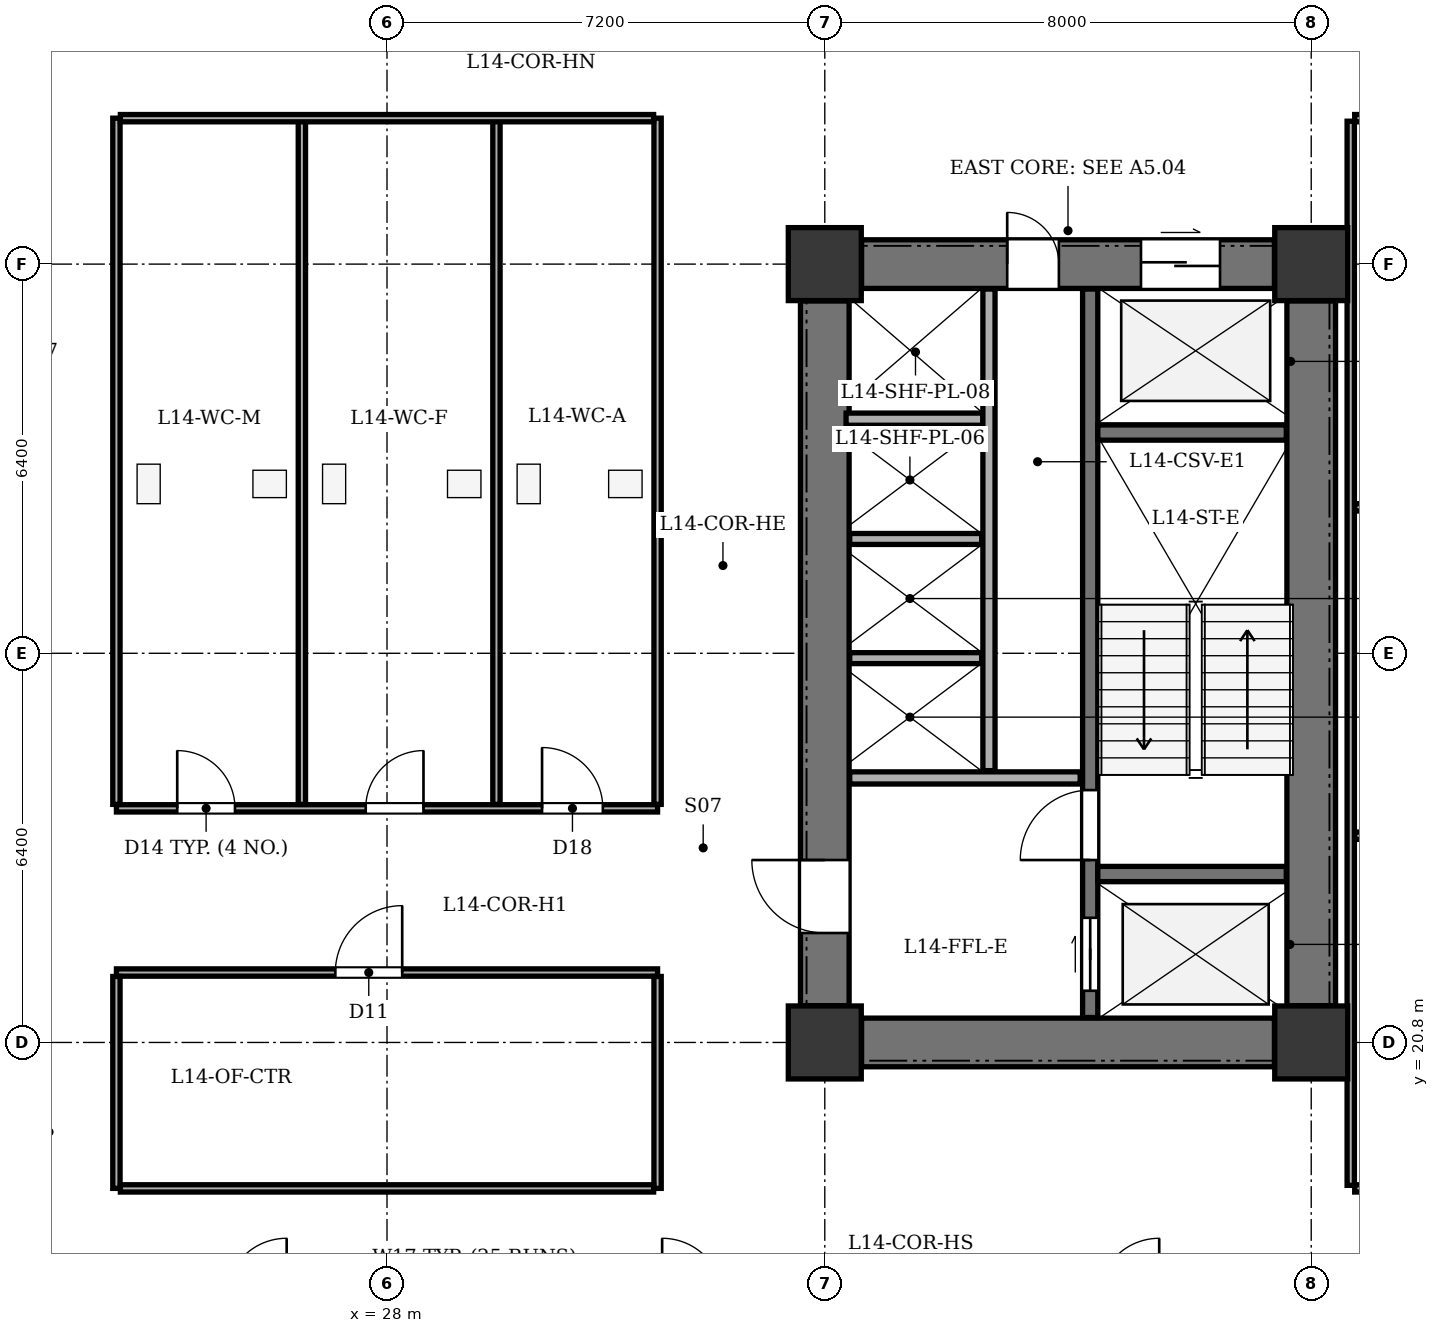
"""IFC4 building model, lengths in metres.
Left out: names, types, materials, properties, quantities, classifications, styles, units other than length and angle.
Written with IfcOpenShell. Run it as: python <this file> out.ifc"""

import sys

from ifc_helpers import new_model, si_unit, direction, frame, frame_2d, origin, origin_2d, place, context, subcontext, project, spatial, rectangle, extrude, element, fill, save


model = new_model("IFC4")
c1 = context("Model", 3, precision=1e-05, world=origin(), true_north=direction((0.0, 1.0)))
c2 = subcontext(c1, "Body", "Model", "MODEL_VIEW")
j1 = project(units=[si_unit("LENGTHUNIT", "METRE"), si_unit("PLANEANGLEUNIT", "RADIAN")], contexts=[c1])
p1 = place(None, origin())
s1 = spatial("IfcSite", under=j1, at=p1, CompositionType="ELEMENT")
p2 = place(p1, origin())
s2 = spatial("IfcBuilding", under=s1, at=p2, CompositionType="ELEMENT")
p3 = place(p2, frame((0.0, 0.0, 59.4)))
s3 = spatial("IfcBuildingStorey", under=s2, at=p3, CompositionType="ELEMENT", Elevation=59.4)
for number, where, z_axis, x_axis in (
    (1, (35.2, 20.8, 0.0), (0.0, 0.0, 1.0), (1.0, 0.0, 0.0)),
    (2, (43.2, 20.8, 0.0), (0.0, 0.0, 1.0), (1.0, 0.0, 0.0)),
    (3, (35.2, 33.6, 0.0), (0.0, 0.0, 1.0), (1.0, 0.0, 0.0)),
    (4, (43.2, 33.6, 0.0), (0.0, 0.0, 1.0), (1.0, 0.0, 0.0)),
):
    element("IfcColumn", number, at=place(p3, frame(where, z_axis=z_axis, x_axis=x_axis)), inside=s3, PredefinedType="COLUMN", context=c2, shape_type="SweptSolid", body=[
        extrude(rectangle(XDim=1.2, YDim=1.2, at=origin_2d()), origin(), (0.0, 0.0, 1.0), 3.9),
    ])
p4 = place(p3, frame((43.2, 21.405, 0.0), z_axis=(0.0, 0.0, 1.0), x_axis=(0.0, 1.0, 0.0)))
e5 = element("IfcWall", 5, at=p4, inside=s3, PredefinedType="SHEAR", context=c2, shape_type="SweptSolid", body=[
    extrude(rectangle(XDim=11.59, YDim=0.8, at=frame_2d((5.795, 0.0))), origin(), (0.0, 0.0, 1.0), 3.6),
])
p5 = place(p3, frame((35.805, 20.8, 0.0), z_axis=(0.0, 0.0, 1.0), x_axis=(1.0, 0.0, 0.0)))
e6 = element("IfcWall", 6, at=p5, inside=s3, PredefinedType="SHEAR", context=c2, shape_type="SweptSolid", body=[
    extrude(rectangle(XDim=6.79, YDim=0.8, at=frame_2d((3.395, 0.0))), origin(), (0.0, 0.0, 1.0), 3.6),
])
p6 = place(p3, frame((35.805, 33.6, 0.0), z_axis=(0.0, 0.0, 1.0), x_axis=(1.0, 0.0, 0.0)))
e7 = element("IfcWall", 7, at=p6, inside=s3, PredefinedType="SHEAR", context=c2, shape_type="SweptSolid", body=[
    extrude(rectangle(XDim=6.79, YDim=0.8, at=frame_2d((3.395, 0.0))), origin(), (0.0, 0.0, 1.0), 3.6),
])
p7 = place(p6, frame((4.595, 0.0, 0.0)))
e8 = element("IfcOpeningElement", 8, at=p7, cuts=e7, PredefinedType="OPENING", context=c2, shape_type="SweptSolid", body=[
    extrude(rectangle(XDim=1.3, YDim=2.15, at=frame_2d((0.65, 1.075))), frame((0.0, 0.41, 0.0), z_axis=(0.0, -1.0, 0.0), x_axis=(1.0, 0.0, 0.0)), (0.0, 0.0, 1.0), 0.82),
])
p8 = place(p6, frame((2.395, 0.0, 0.0)))
e9 = element("IfcOpeningElement", 9, at=p8, cuts=e7, PredefinedType="OPENING", context=c2, shape_type="SweptSolid", body=[
    extrude(rectangle(XDim=0.85, YDim=2.02, at=frame_2d((0.425, 1.01))), frame((0.0, 0.41, 0.0), z_axis=(0.0, -1.0, 0.0), x_axis=(1.0, 0.0, 0.0)), (0.0, 0.0, 1.0), 0.82),
])
p9 = place(p3, frame((35.2, 21.405, 0.0), z_axis=(0.0, 0.0, 1.0), x_axis=(0.0, 1.0, 0.0)))
e10 = element("IfcWall", 10, at=p9, inside=s3, PredefinedType="SHEAR", context=c2, shape_type="SweptSolid", body=[
    extrude(rectangle(XDim=11.59, YDim=0.8, at=frame_2d((5.795, 0.0))), origin(), (0.0, 0.0, 1.0), 3.6),
])
p10 = place(p9, frame((1.195, 0.0, 0.0)))
e11 = element("IfcOpeningElement", 11, at=p10, cuts=e10, PredefinedType="OPENING", context=c2, shape_type="SweptSolid", body=[
    extrude(rectangle(XDim=1.2, YDim=2.15, at=frame_2d((0.6, 1.075))), frame((0.0, 0.41, 0.0), z_axis=(0.0, -1.0, 0.0), x_axis=(1.0, 0.0, 0.0)), (0.0, 0.0, 1.0), 0.82),
])
p11 = place(p3, frame((39.565, 21.21, 0.0), z_axis=(0.0, 0.0, 1.0), x_axis=(0.0, 1.0, 0.0)))
e12 = element("IfcWall", 12, at=p11, inside=s3, PredefinedType="SHEAR", context=c2, shape_type="SweptSolid", body=[
    extrude(rectangle(XDim=11.98, YDim=0.25, at=frame_2d((5.99, 0.0))), origin(), (0.0, 0.0, 1.0), 3.6),
])
p12 = place(p11, frame((0.44, 0.0, 0.0)))
e13 = element("IfcOpeningElement", 13, at=p12, cuts=e12, PredefinedType="OPENING", context=c2, shape_type="SweptSolid", body=[
    extrude(rectangle(XDim=1.2, YDim=2.15, at=frame_2d((0.6, 1.075))), frame((0.0, 0.135, 0.0), z_axis=(0.0, -1.0, 0.0), x_axis=(1.0, 0.0, 0.0)), (0.0, 0.0, 1.0), 0.27),
])
p13 = place(p11, frame((2.59, 0.0, 0.0)))
e14 = element("IfcOpeningElement", 14, at=p13, cuts=e12, PredefinedType="OPENING", context=c2, shape_type="SweptSolid", body=[
    extrude(rectangle(XDim=1.15, YDim=2.15, at=frame_2d((0.575, 1.075))), frame((0.0, 0.135, 0.0), z_axis=(0.0, -1.0, 0.0), x_axis=(1.0, 0.0, 0.0)), (0.0, 0.0, 1.0), 0.27),
])
for number, where, z_axis, x_axis in (
    (15, (39.69, 23.57, 0.0), (0.0, 0.0, 1.0), (1.0, 0.0, 0.0)),
    (16, (39.69, 30.83, 0.0), (0.0, 0.0, 1.0), (1.0, 0.0, 0.0)),
):
    element("IfcWall", number, at=place(p3, frame(where, z_axis=z_axis, x_axis=x_axis)), inside=s3, PredefinedType="SHEAR", context=c2, shape_type="SweptSolid", body=[
        extrude(rectangle(XDim=3.1, YDim=0.25, at=frame_2d((1.55, 0.0))), origin(), (0.0, 0.0, 1.0), 3.6),
    ])
p14 = place(p3, frame((35.61, 25.15, 0.0), z_axis=(0.0, 0.0, 1.0), x_axis=(1.0, 0.0, 0.0)))
e17 = element("IfcWall", 17, at=p14, inside=s3, PredefinedType="SOLIDWALL", context=c2, shape_type="SweptSolid", body=[
    extrude(rectangle(XDim=3.79, YDim=0.2, at=frame_2d((1.895, 0.0))), origin(), (0.0, 0.0, 1.0), 3.6),
])
p15 = place(p3, frame((35.55, 31.05, 0.0), z_axis=(0.0, 0.0, 1.0), x_axis=(1.0, 0.0, 0.0)))
e18 = element("IfcWall", 18, at=p15, inside=s3, PredefinedType="SOLIDWALL", context=c2, shape_type="SweptSolid", body=[
    extrude(rectangle(XDim=2.25, YDim=0.2, at=frame_2d((1.125, 0.0))), origin(), (0.0, 0.0, 1.0), 3.6),
])
p16 = place(p3, frame((37.9, 25.27, 0.0), z_axis=(0.0, 0.0, 1.0), x_axis=(0.0, 1.0, 0.0)))
e19 = element("IfcWall", 19, at=p16, inside=s3, PredefinedType="SOLIDWALL", context=c2, shape_type="SweptSolid", body=[
    extrude(rectangle(XDim=7.92, YDim=0.2, at=frame_2d((3.96, 0.0))), origin(), (0.0, 0.0, 1.0), 3.6),
])
for number, where, z_axis, x_axis in (
    (20, (35.61, 27.12, 0.0), (0.0, 0.0, 1.0), (1.0, 0.0, 0.0)),
    (21, (35.61, 29.08, 0.0), (0.0, 0.0, 1.0), (1.0, 0.0, 0.0)),
):
    element("IfcWall", number, at=place(p3, frame(where, z_axis=z_axis, x_axis=x_axis)), inside=s3, PredefinedType="PARTITIONING", context=c2, shape_type="SweptSolid", body=[
        extrude(rectangle(XDim=2.17, YDim=0.18, at=frame_2d((1.085, 0.0))), origin(), (0.0, 0.0, 1.0), 3.6),
    ])
p17 = place(p3, frame((23.55, 24.65, 0.0), z_axis=(0.0, 0.0, 1.0), x_axis=(1.0, 0.0, 0.0)))
e22 = element("IfcWall", 22, at=p17, inside=s3, PredefinedType="PARTITIONING", context=c2, shape_type="SweptSolid", body=[
    extrude(rectangle(XDim=8.9, YDim=0.12, at=frame_2d((4.45, 0.0))), origin(), (0.0, 0.0, 1.0), 3.135),
])
p18 = place(p17, frame((1.0, 0.0, 0.0)))
e23 = element("IfcOpeningElement", 23, at=p18, cuts=e22, PredefinedType="OPENING", context=c2, shape_type="SweptSolid", body=[
    extrude(rectangle(XDim=0.95, YDim=2.1, at=frame_2d((0.475, 1.05))), frame((0.0, 0.07, 0.0), z_axis=(0.0, -1.0, 0.0), x_axis=(1.0, 0.0, 0.0)), (0.0, 0.0, 1.0), 0.14),
])
p19 = place(p17, frame((4.1, 0.0, 0.0)))
e24 = element("IfcOpeningElement", 24, at=p19, cuts=e22, PredefinedType="OPENING", context=c2, shape_type="SweptSolid", body=[
    extrude(rectangle(XDim=0.95, YDim=2.1, at=frame_2d((0.475, 1.05))), frame((0.0, 0.07, 0.0), z_axis=(0.0, -1.0, 0.0), x_axis=(1.0, 0.0, 0.0)), (0.0, 0.0, 1.0), 0.14),
])
p20 = place(p17, frame((7.0, 0.0, 0.0)))
e25 = element("IfcOpeningElement", 25, at=p20, cuts=e22, PredefinedType="OPENING", context=c2, shape_type="SweptSolid", body=[
    extrude(rectangle(XDim=1.0, YDim=2.1, at=frame_2d((0.5, 1.05))), frame((0.0, 0.07, 0.0), z_axis=(0.0, -1.0, 0.0), x_axis=(1.0, 0.0, 0.0)), (0.0, 0.0, 1.0), 0.14),
])
for number, where, z_axis, x_axis in (
    (26, (23.55, 24.715, 0.0), (0.0, 0.0, 1.0), (0.0, 1.0, 0.0)),
    (27, (32.45, 24.715, 0.0), (0.0, 0.0, 1.0), (0.0, 1.0, 0.0)),
    (28, (26.6, 24.715, 0.0), (0.0, 0.0, 1.0), (0.0, 1.0, 0.0)),
):
    element("IfcWall", number, at=place(p3, frame(where, z_axis=z_axis, x_axis=x_axis)), inside=s3, PredefinedType="PARTITIONING", context=c2, shape_type="SweptSolid", body=[
        extrude(rectangle(XDim=11.285, YDim=0.12, at=frame_2d((5.643, 0.0))), origin(), (0.0, 0.0, 1.0), 3.6),
    ])
p21 = place(p3, frame((29.8, 24.715, 0.0), z_axis=(0.0, 0.0, 1.0), x_axis=(0.0, 1.0, 0.0)))
e29 = element("IfcWall", 29, at=p21, inside=s3, PredefinedType="PARTITIONING", context=c2, shape_type="SweptSolid", body=[
    extrude(rectangle(XDim=11.285, YDim=0.12, at=frame_2d((5.643, 0.0))), origin(), (0.0, 0.0, 1.0), 3.135),
])
p22 = place(p3, frame((23.615, 36.0, 0.0), z_axis=(0.0, 0.0, 1.0), x_axis=(1.0, 0.0, 0.0)))
e30 = element("IfcWall", 30, at=p22, inside=s3, PredefinedType="PARTITIONING", context=c2, shape_type="SweptSolid", body=[
    extrude(rectangle(XDim=8.77, YDim=0.12, at=frame_2d((4.385, 0.0))), origin(), (0.0, 0.0, 1.0), 3.6),
])
p23 = place(p3, frame((23.55, 21.95, 0.0), z_axis=(0.0, 0.0, 1.0), x_axis=(1.0, 0.0, 0.0)))
e31 = element("IfcWall", 31, at=p23, inside=s3, PredefinedType="PARTITIONING", context=c2, shape_type="SweptSolid", body=[
    extrude(rectangle(XDim=8.9, YDim=0.12, at=frame_2d((4.45, 0.0))), origin(), (0.0, 0.0, 1.0), 3.135),
])
p24 = place(p23, frame((3.6, 0.0, 0.0)))
e32 = element("IfcOpeningElement", 32, at=p24, cuts=e31, PredefinedType="OPENING", context=c2, shape_type="SweptSolid", body=[
    extrude(rectangle(XDim=1.1, YDim=2.15, at=frame_2d((0.55, 1.075))), frame((0.0, 0.07, 0.0), z_axis=(0.0, -1.0, 0.0), x_axis=(1.0, 0.0, 0.0)), (0.0, 0.0, 1.0), 0.14),
])
for number, where, z_axis, x_axis in (
    (33, (23.55, 18.4, 0.0), (0.0, 0.0, 1.0), (0.0, 1.0, 0.0)),
    (34, (32.45, 18.4, 0.0), (0.0, 0.0, 1.0), (0.0, 1.0, 0.0)),
):
    element("IfcWall", number, at=place(p3, frame(where, z_axis=z_axis, x_axis=x_axis)), inside=s3, PredefinedType="PARTITIONING", context=c2, shape_type="SweptSolid", body=[
        extrude(rectangle(XDim=3.485, YDim=0.12, at=frame_2d((1.743, 0.0))), origin(), (0.0, 0.0, 1.0), 3.6),
    ])
p25 = place(p3, frame((23.615, 18.4, 0.0), z_axis=(0.0, 0.0, 1.0), x_axis=(1.0, 0.0, 0.0)))
e35 = element("IfcWall", 35, at=p25, inside=s3, PredefinedType="PARTITIONING", context=c2, shape_type="SweptSolid", body=[
    extrude(rectangle(XDim=8.77, YDim=0.12, at=frame_2d((4.385, 0.0))), origin(), (0.0, 0.0, 1.0), 3.6),
])
p26 = place(p3, frame((43.85, 18.45, 0.0), z_axis=(0.0, 0.0, 1.0), x_axis=(0.0, 1.0, 0.0)))
e36 = element("IfcWall", 36, at=p26, inside=s3, PredefinedType="PARTITIONING", context=c2, shape_type="SweptSolid", body=[
    extrude(rectangle(XDim=17.5, YDim=0.12, at=frame_2d((8.75, 0.0))), origin(), (0.0, 0.0, 1.0), 3.6),
])
p27 = place(p3, frame((43.915, 18.4, 0.0), z_axis=(0.0, 0.0, 1.0), x_axis=(1.0, 0.0, 0.0)))
e37 = element("IfcWall", 37, at=p27, inside=s3, PredefinedType="PARTITIONING", context=c2, shape_type="SweptSolid", body=[
    extrude(rectangle(XDim=11.38, YDim=0.12, at=frame_2d((5.69, 0.0))), origin(), (0.0, 0.0, 1.0), 3.6),
])
p28 = place(p27, frame((1.485, 0.0, 0.0)))
e38 = element("IfcOpeningElement", 38, at=p28, cuts=e37, PredefinedType="OPENING", context=c2, shape_type="SweptSolid", body=[
    extrude(rectangle(XDim=0.95, YDim=2.1, at=frame_2d((0.475, 1.05))), frame((0.0, 0.07, 0.0), z_axis=(0.0, -1.0, 0.0), x_axis=(1.0, 0.0, 0.0)), (0.0, 0.0, 1.0), 0.14),
])
p29 = place(p3, frame((43.915, 36.0, 0.0), z_axis=(0.0, 0.0, 1.0), x_axis=(1.0, 0.0, 0.0)))
e39 = element("IfcWall", 39, at=p29, inside=s3, PredefinedType="PARTITIONING", context=c2, shape_type="SweptSolid", body=[
    extrude(rectangle(XDim=11.38, YDim=0.12, at=frame_2d((5.69, 0.0))), origin(), (0.0, 0.0, 1.0), 3.6),
])
p30 = place(p29, frame((1.485, 0.0, 0.0)))
e40 = element("IfcOpeningElement", 40, at=p30, cuts=e39, PredefinedType="OPENING", context=c2, shape_type="SweptSolid", body=[
    extrude(rectangle(XDim=0.95, YDim=2.1, at=frame_2d((0.475, 1.05))), frame((0.0, 0.07, 0.0), z_axis=(0.0, -1.0, 0.0), x_axis=(1.0, 0.0, 0.0)), (0.0, 0.0, 1.0), 0.14),
])
p31 = place(p3, frame((43.915, 24.2, 0.0), z_axis=(0.0, 0.0, 1.0), x_axis=(1.0, 0.0, 0.0)))
e41 = element("IfcWall", 41, at=p31, inside=s3, PredefinedType="PARTITIONING", context=c2, shape_type="SweptSolid", body=[
    extrude(rectangle(XDim=11.38, YDim=0.12, at=frame_2d((5.69, 0.0))), origin(), (0.0, 0.0, 1.0), 3.6),
])
p32 = place(p31, frame((1.985, 0.0, 0.0)))
e42 = element("IfcOpeningElement", 42, at=p32, cuts=e41, PredefinedType="OPENING", context=c2, shape_type="SweptSolid", body=[
    extrude(rectangle(XDim=0.9, YDim=2.05, at=frame_2d((0.45, 1.025))), frame((0.0, 0.07, 0.0), z_axis=(0.0, -1.0, 0.0), x_axis=(1.0, 0.0, 0.0)), (0.0, 0.0, 1.0), 0.14),
])
p33 = place(p3, frame((43.915, 29.6, 0.0), z_axis=(0.0, 0.0, 1.0), x_axis=(1.0, 0.0, 0.0)))
e43 = element("IfcWall", 43, at=p33, inside=s3, PredefinedType="PARTITIONING", context=c2, shape_type="SweptSolid", body=[
    extrude(rectangle(XDim=11.38, YDim=0.12, at=frame_2d((5.69, 0.0))), origin(), (0.0, 0.0, 1.0), 3.6),
])
p34 = place(p33, frame((1.985, 0.0, 0.0)))
e44 = element("IfcOpeningElement", 44, at=p34, cuts=e43, PredefinedType="OPENING", context=c2, shape_type="SweptSolid", body=[
    extrude(rectangle(XDim=0.9, YDim=2.05, at=frame_2d((0.45, 1.025))), frame((0.0, 0.07, 0.0), z_axis=(0.0, -1.0, 0.0), x_axis=(1.0, 0.0, 0.0)), (0.0, 0.0, 1.0), 0.14),
])
p35 = place(p7, origin())
e45 = element("IfcDoor", 45, at=p35, inside=s3, OperationType="DOUBLE_DOOR_SLIDING", PredefinedType="DOOR", context=c2, shape_type="SweptSolid", body=[
    extrude(rectangle(XDim=1.3, YDim=2.15, at=frame_2d((0.65, 1.075))), frame((0.0, 0.025, 0.0), z_axis=(0.0, -1.0, 0.0), x_axis=(1.0, 0.0, 0.0)), (0.0, 0.0, 1.0), 0.05),
])
fill(e8, e45)
p36 = place(p8, origin())
e46 = element("IfcDoor", 46, at=p36, inside=s3, OperationType="SINGLE_SWING_LEFT", PredefinedType="DOOR", context=c2, shape_type="SweptSolid", body=[
    extrude(rectangle(XDim=0.85, YDim=2.02, at=frame_2d((0.425, 1.01))), frame((0.0, 0.025, 0.0), z_axis=(0.0, -1.0, 0.0), x_axis=(1.0, 0.0, 0.0)), (0.0, 0.0, 1.0), 0.05),
])
fill(e9, e46)
p37 = place(p10, origin())
e47 = element("IfcDoor", 47, at=p37, inside=s3, OperationType="SINGLE_SWING_RIGHT", PredefinedType="DOOR", context=c2, shape_type="SweptSolid", body=[
    extrude(rectangle(XDim=1.2, YDim=2.15, at=frame_2d((0.6, 1.075))), frame((0.0, 0.025, 0.0), z_axis=(0.0, -1.0, 0.0), x_axis=(1.0, 0.0, 0.0)), (0.0, 0.0, 1.0), 0.05),
])
fill(e11, e47)
p38 = place(p12, origin())
e48 = element("IfcDoor", 48, at=p38, inside=s3, OperationType="DOUBLE_DOOR_SLIDING", PredefinedType="DOOR", context=c2, shape_type="SweptSolid", body=[
    extrude(rectangle(XDim=1.2, YDim=2.15, at=frame_2d((0.6, 1.075))), frame((0.0, 0.025, 0.0), z_axis=(0.0, -1.0, 0.0), x_axis=(1.0, 0.0, 0.0)), (0.0, 0.0, 1.0), 0.05),
])
fill(e13, e48)
p39 = place(p13, origin())
e49 = element("IfcDoor", 49, at=p39, inside=s3, OperationType="SINGLE_SWING_LEFT", PredefinedType="DOOR", context=c2, shape_type="SweptSolid", body=[
    extrude(rectangle(XDim=1.15, YDim=2.15, at=frame_2d((0.575, 1.075))), frame((0.0, 0.025, 0.0), z_axis=(0.0, -1.0, 0.0), x_axis=(1.0, 0.0, 0.0)), (0.0, 0.0, 1.0), 0.05),
])
fill(e14, e49)
p40 = place(p18, origin())
e50 = element("IfcDoor", 50, at=p40, inside=s3, OperationType="SINGLE_SWING_LEFT", PredefinedType="DOOR", context=c2, shape_type="SweptSolid", body=[
    extrude(rectangle(XDim=0.95, YDim=2.1, at=frame_2d((0.475, 1.05))), frame((0.0, 0.025, 0.0), z_axis=(0.0, -1.0, 0.0), x_axis=(1.0, 0.0, 0.0)), (0.0, 0.0, 1.0), 0.05),
])
fill(e23, e50)
p41 = place(p19, origin())
e51 = element("IfcDoor", 51, at=p41, inside=s3, OperationType="SINGLE_SWING_RIGHT", PredefinedType="DOOR", context=c2, shape_type="SweptSolid", body=[
    extrude(rectangle(XDim=0.95, YDim=2.1, at=frame_2d((0.475, 1.05))), frame((0.0, 0.025, 0.0), z_axis=(0.0, -1.0, 0.0), x_axis=(1.0, 0.0, 0.0)), (0.0, 0.0, 1.0), 0.05),
])
fill(e24, e51)
p42 = place(p20, origin())
e52 = element("IfcDoor", 52, at=p42, inside=s3, OperationType="SINGLE_SWING_LEFT", PredefinedType="DOOR", context=c2, shape_type="SweptSolid", body=[
    extrude(rectangle(XDim=1.0, YDim=2.1, at=frame_2d((0.5, 1.05))), frame((0.0, 0.025, 0.0), z_axis=(0.0, -1.0, 0.0), x_axis=(1.0, 0.0, 0.0)), (0.0, 0.0, 1.0), 0.05),
])
fill(e25, e52)
p43 = place(p24, origin())
e53 = element("IfcDoor", 53, at=p43, inside=s3, OperationType="SINGLE_SWING_RIGHT", PredefinedType="DOOR", context=c2, shape_type="SweptSolid", body=[
    extrude(rectangle(XDim=1.1, YDim=2.15, at=frame_2d((0.55, 1.075))), frame((0.0, 0.025, 0.0), z_axis=(0.0, -1.0, 0.0), x_axis=(1.0, 0.0, 0.0)), (0.0, 0.0, 1.0), 0.05),
])
fill(e32, e53)
save(model, sys.argv[1])
